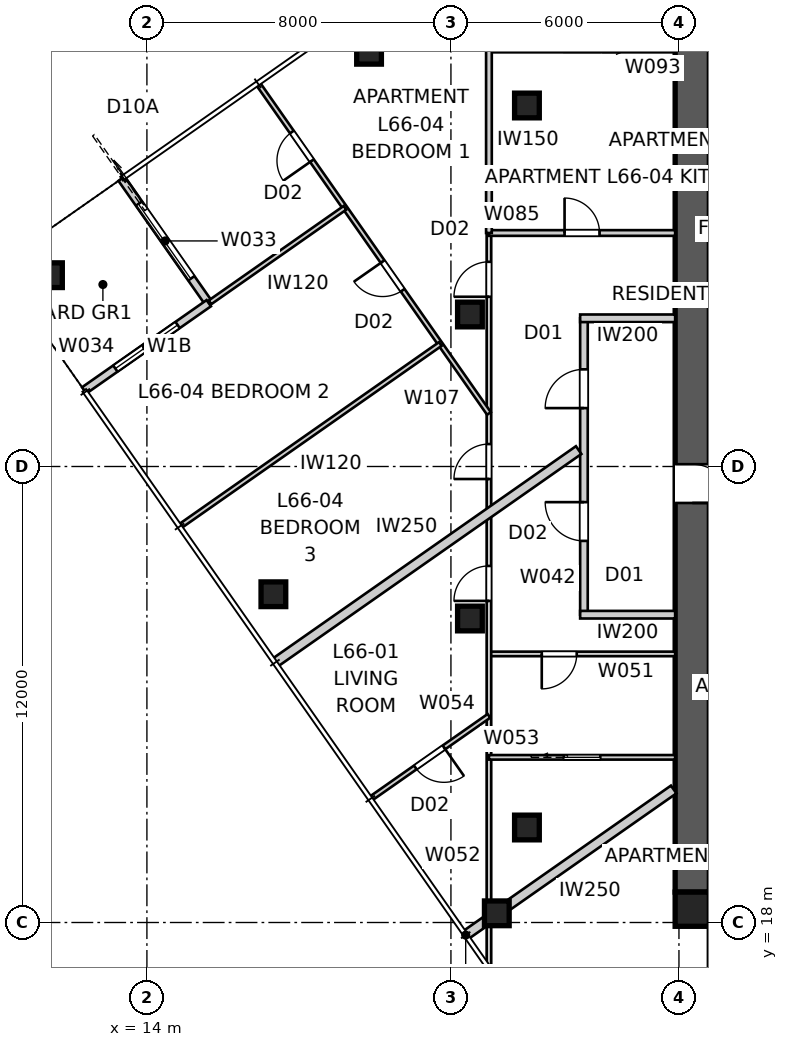
"""IFC4 building model, lengths in metres.
Left out: names, types, materials, properties, quantities, classifications, styles, units other than length and angle.
Written with IfcOpenShell. Run it as: python <this file> out.ifc"""

import sys

from ifc_helpers import new_model, si_unit, direction, frame, frame_2d, origin, origin_2d, place, context, subcontext, project, spatial, polyline, rectangle, outline, extrude, element, fill, save


model = new_model("IFC4")
c1 = context("Model", 3, precision=1e-05, world=origin(), true_north=direction((0.0, 1.0)))
c2 = subcontext(c1, "Body", "Model", "MODEL_VIEW")
j1 = project(units=[si_unit("LENGTHUNIT", "METRE"), si_unit("PLANEANGLEUNIT", "RADIAN")], contexts=[c1])
p1 = place(None, origin())
s1 = spatial("IfcSite", under=j1, at=p1, CompositionType="ELEMENT")
p2 = place(p1, origin())
s2 = spatial("IfcBuilding", under=s1, at=p2, CompositionType="ELEMENT")
p3 = place(p2, frame((0.0, 0.0, 240.4)))
s3 = spatial("IfcBuildingStorey", under=s2, at=p3, CompositionType="ELEMENT", Elevation=240.4)
p4 = place(p3, frame((51.2, 18.35, 0.0), z_axis=(0.0, 0.0, 1.0), x_axis=(-1.0, 0.0, 0.0)))
e1 = element("IfcWall", 1, at=p4, inside=s3, PredefinedType="SHEAR", context=c2, shape_type="SweptSolid", body=[
    extrude(outline(polyline([(0.0, -0.45), (22.4, -0.45), (22.4, -0.025), (22.85, -0.025), (22.85, 0.025), (22.4, 0.025), (22.4, 0.45), (0.0, 0.45), (0.0, 0.025), (-0.45, 0.025), (-0.45, -0.025), (0.0, -0.025), (0.0, -0.45)])), origin(), (0.0, 0.0, 1.0), 3.4),
])
p5 = place(p3, frame((28.35, 41.2, 0.0), z_axis=(0.0, 0.0, 1.0), x_axis=(0.0, -1.0, 0.0)))
e2 = element("IfcWall", 2, at=p5, inside=s3, PredefinedType="SHEAR", context=c2, shape_type="SweptSolid", body=[
    extrude(outline(polyline([(0.0, -0.45), (22.4, -0.45), (22.4, -0.025), (22.85, -0.025), (22.85, 0.025), (22.4, 0.025), (22.4, 0.45), (0.0, 0.45), (0.0, 0.025), (-0.45, 0.025), (-0.45, -0.025), (0.0, -0.025), (0.0, -0.45)])), origin(), (0.0, 0.0, 1.0), 3.4),
])
p6 = place(p5, frame((11.14, 0.0, 0.0)))
e3 = element("IfcOpeningElement", 3, at=p6, cuts=e2, PredefinedType="OPENING", context=c2, shape_type="SweptSolid", body=[
    extrude(rectangle(XDim=1.02, YDim=2.4, at=frame_2d((0.51, 1.2))), frame((0.0, 0.46, 0.0), z_axis=(0.0, -1.0, 0.0), x_axis=(1.0, 0.0, 0.0)), (0.0, 0.0, 1.0), 0.92),
])
p7 = place(p3, frame((28.35, 18.35, 0.0), z_axis=(0.0, 0.0, 1.0), x_axis=(1.0, 0.0, 0.0)))
e4 = element("IfcColumn", 4, at=p7, inside=s3, PredefinedType="COLUMN", context=c2, shape_type="SweptSolid", body=[
    extrude(rectangle(XDim=0.9, YDim=0.9, at=origin_2d()), origin(), (0.0, 0.0, 1.0), 3.4),
])
for number, where, z_axis, x_axis in (
    (5, (19.845, 40.914, -0.15), (0.0, 0.0, 1.0), (1.0, 0.0, 0.0)),
    (6, (11.449, 35.034, -0.15), (0.0, 0.0, 1.0), (1.0, 0.0, 0.0)),
    (7, (17.328, 26.638, -0.15), (0.0, 0.0, 1.0), (1.0, 0.0, 0.0)),
    (8, (23.207, 18.242, -0.15), (0.0, 0.0, 1.0), (1.0, 0.0, 0.0)),
):
    element("IfcColumn", number, at=place(p3, frame(where, z_axis=z_axis, x_axis=x_axis)), inside=s3, PredefinedType="COLUMN", context=c2, shape_type="SweptSolid", body=[
        extrude(rectangle(XDim=0.65, YDim=0.65, at=origin_2d()), origin(), (0.0, 0.0, 1.0), 3.55),
    ])
for number, where, z_axis, x_axis in (
    (9, (24.0, 39.5, 0.0), (0.0, 0.0, 1.0), (1.0, 0.0, 0.0)),
    (10, (22.5, 34.0, 0.0), (0.0, 0.0, 1.0), (1.0, 0.0, 0.0)),
    (11, (22.5, 26.0, 0.0), (0.0, 0.0, 1.0), (1.0, 0.0, 0.0)),
    (12, (24.0, 20.5, 0.0), (0.0, 0.0, 1.0), (1.0, 0.0, 0.0)),
):
    element("IfcColumn", number, at=place(p3, frame(where, z_axis=z_axis, x_axis=x_axis)), inside=s3, PredefinedType="COLUMN", context=c2, shape_type="SweptSolid", body=[
        extrude(rectangle(XDim=0.65, YDim=0.65, at=origin_2d()), origin(), (0.0, 0.0, 1.0), 3.4),
    ])
p8 = place(p3, frame((13.333, 37.574, 0.0), z_axis=(0.0, 0.0, 1.0), x_axis=(0.573556557423, -0.819165963305, 0.0)))
e13 = element("IfcWall", 13, at=p8, inside=s3, PredefinedType="SOLIDWALL", context=c2, shape_type="SweptSolid", body=[
    extrude(rectangle(XDim=4.0, YDim=0.2, at=frame_2d((2.0, 0.0))), origin(), (0.0, 0.0, 1.0), 3.25),
])
p9 = place(p8, frame((0.8, 0.0, 0.0)))
e14 = element("IfcOpeningElement", 14, at=p9, cuts=e13, PredefinedType="OPENING", context=c2, shape_type="SweptSolid", body=[
    extrude(rectangle(XDim=2.4, YDim=2.1, at=frame_2d((1.2, 1.05))), frame((0.0, 0.11, 0.0), z_axis=(0.0, -1.0, 0.0), x_axis=(1.0, 0.0, 0.0)), (0.0, 0.0, 1.0), 0.22),
])
p10 = place(p3, frame((15.627, 34.298, 0.0), z_axis=(0.0, 0.0, 1.0), x_axis=(-0.819137286189, -0.573597512525, 0.0)))
e15 = element("IfcWall", 15, at=p10, inside=s3, PredefinedType="SOLIDWALL", context=c2, shape_type="SweptSolid", body=[
    extrude(rectangle(XDim=4.0, YDim=0.2, at=frame_2d((2.0, 0.0))), origin(), (0.0, 0.0, 1.0), 3.25),
])
p11 = place(p10, frame((1.0, 0.0, 0.45)))
e16 = element("IfcOpeningElement", 16, at=p11, cuts=e15, PredefinedType="OPENING", context=c2, shape_type="SweptSolid", body=[
    extrude(rectangle(XDim=2.0, YDim=1.8, at=frame_2d((1.0, 0.9))), frame((0.0, 0.11, 0.0), z_axis=(0.0, -1.0, 0.0), x_axis=(1.0, 0.0, 0.0)), (0.0, 0.0, 1.0), 0.22),
])
p12 = place(p3, frame((25.5, 26.1, 0.0), z_axis=(0.0, 0.0, 1.0), x_axis=(0.0, 1.0, 0.0)))
e17 = element("IfcWall", 17, at=p12, inside=s3, PredefinedType="PARTITIONING", context=c2, shape_type="SweptSolid", body=[
    extrude(rectangle(XDim=7.8, YDim=0.2, at=frame_2d((3.9, 0.0))), origin(), (0.0, 0.0, 1.0), 3.25),
])
p13 = place(p12, frame((1.942, 0.0, 0.0)))
e18 = element("IfcOpeningElement", 18, at=p13, cuts=e17, PredefinedType="OPENING", context=c2, shape_type="SweptSolid", body=[
    extrude(rectangle(XDim=1.02, YDim=2.34, at=frame_2d((0.51, 1.17))), frame((0.0, 0.11, 0.0), z_axis=(0.0, -1.0, 0.0), x_axis=(1.0, 0.0, 0.0)), (0.0, 0.0, 1.0), 0.22),
])
p14 = place(p12, frame((5.437, 0.0, 0.0)))
e19 = element("IfcOpeningElement", 19, at=p14, cuts=e17, PredefinedType="OPENING", context=c2, shape_type="SweptSolid", body=[
    extrude(rectangle(XDim=1.02, YDim=2.34, at=frame_2d((0.51, 1.17))), frame((0.0, 0.11, 0.0), z_axis=(0.0, -1.0, 0.0), x_axis=(1.0, 0.0, 0.0)), (0.0, 0.0, 1.0), 0.22),
])
for number, where, z_axis, x_axis in (
    (20, (27.9, 33.9, 0.0), (0.0, 0.0, 1.0), (-1.0, 0.0, 0.0)),
    (21, (27.9, 26.1, 0.0), (0.0, 0.0, 1.0), (-1.0, 0.0, 0.0)),
):
    element("IfcWall", number, at=place(p3, frame(where, z_axis=z_axis, x_axis=x_axis)), inside=s3, PredefinedType="PARTITIONING", context=c2, shape_type="SweptSolid", body=[
        extrude(rectangle(XDim=2.5, YDim=0.2, at=frame_2d((1.25, 0.0))), origin(), (0.0, 0.0, 1.0), 3.25),
    ])
p15 = place(p3, frame((22.388, 17.668, 0.0), z_axis=(0.0, 0.0, 1.0), x_axis=(0.819161528122, 0.573562891796, 0.0)))
e22 = element("IfcWall", 22, at=p15, inside=s3, PredefinedType="PARTITIONING", context=c2, shape_type="SweptSolid", body=[
    extrude(rectangle(XDim=6.681, YDim=0.25, at=frame_2d((3.341, 0.0))), origin(), (0.0, 0.0, 1.0), 3.25),
])
p16 = place(p3, frame((17.369, 24.836, 0.0), z_axis=(0.0, 0.0, 1.0), x_axis=(0.81915902312, 0.573566469418, 0.0)))
e23 = element("IfcWall", 23, at=p16, inside=s3, PredefinedType="PARTITIONING", context=c2, shape_type="SweptSolid", body=[
    extrude(rectangle(XDim=9.756, YDim=0.25, at=frame_2d((4.878, 0.0))), origin(), (0.0, 0.0, 1.0), 3.25),
])
p17 = place(p3, frame((27.9, 25.068, 0.0), z_axis=(0.0, 0.0, 1.0), x_axis=(-1.0, 0.0, 0.0)))
e24 = element("IfcWall", 24, at=p17, inside=s3, PredefinedType="PARTITIONING", context=c2, shape_type="SweptSolid", body=[
    extrude(rectangle(XDim=4.9, YDim=0.12, at=frame_2d((2.45, 0.0))), origin(), (0.0, 0.0, 1.0), 3.25),
])
p18 = place(p17, frame((2.59, 0.0, 0.0)))
e25 = element("IfcOpeningElement", 25, at=p18, cuts=e24, PredefinedType="OPENING", context=c2, shape_type="SweptSolid", body=[
    extrude(rectangle(XDim=0.92, YDim=2.34, at=frame_2d((0.46, 1.17))), frame((0.0, 0.07, 0.0), z_axis=(0.0, -1.0, 0.0), x_axis=(1.0, 0.0, 0.0)), (0.0, 0.0, 1.0), 0.14),
])
p19 = place(p3, frame((23.0, 16.864, 0.0), z_axis=(0.0, 0.0, 1.0), x_axis=(0.0, 1.0, 0.0)))
e26 = element("IfcWall", 26, at=p19, inside=s3, PredefinedType="PARTITIONING", context=c2, shape_type="SweptSolid", body=[
    extrude(rectangle(XDim=19.28, YDim=0.12, at=frame_2d((9.64, 0.0))), origin(), (0.0, 0.0, 1.0), 2.55),
])
p20 = place(p19, frame((9.599, 0.0, 0.0)))
e27 = element("IfcOpeningElement", 27, at=p20, cuts=e26, PredefinedType="OPENING", context=c2, shape_type="SweptSolid", body=[
    extrude(rectangle(XDim=0.92, YDim=2.34, at=frame_2d((0.46, 1.17))), frame((0.0, 0.07, 0.0), z_axis=(0.0, -1.0, 0.0), x_axis=(1.0, 0.0, 0.0)), (0.0, 0.0, 1.0), 0.14),
])
p21 = place(p19, frame((17.603, 0.0, 0.0)))
e28 = element("IfcOpeningElement", 28, at=p21, cuts=e26, PredefinedType="OPENING", context=c2, shape_type="SweptSolid", body=[
    extrude(rectangle(XDim=0.92, YDim=2.34, at=frame_2d((0.46, 1.17))), frame((0.0, 0.07, 0.0), z_axis=(0.0, -1.0, 0.0), x_axis=(1.0, 0.0, 0.0)), (0.0, 0.0, 1.0), 0.14),
])
p22 = place(p19, frame((12.806, 0.0, 0.0)))
e29 = element("IfcOpeningElement", 29, at=p22, cuts=e26, PredefinedType="OPENING", context=c2, shape_type="SweptSolid", body=[
    extrude(rectangle(XDim=0.92, YDim=2.34, at=frame_2d((0.46, 1.17))), frame((0.0, 0.07, 0.0), z_axis=(0.0, -1.0, 0.0), x_axis=(1.0, 0.0, 0.0)), (0.0, 0.0, 1.0), 0.14),
])
p23 = place(p3, frame((23.0, 22.347, 0.0), z_axis=(0.0, 0.0, 1.0), x_axis=(1.0, 0.0, 0.0)))
e30 = element("IfcWall", 30, at=p23, inside=s3, PredefinedType="PARTITIONING", context=c2, shape_type="SweptSolid", body=[
    extrude(rectangle(XDim=4.9, YDim=0.12, at=frame_2d((2.45, 0.0))), origin(), (0.0, 0.0, 1.0), 3.25),
])
p24 = place(p23, frame((1.97, 0.0, 0.0)))
e31 = element("IfcOpeningElement", 31, at=p24, cuts=e30, PredefinedType="OPENING", context=c2, shape_type="SweptSolid", body=[
    extrude(rectangle(XDim=0.96, YDim=2.1, at=frame_2d((0.48, 1.05))), frame((0.0, 0.07, 0.0), z_axis=(0.0, -1.0, 0.0), x_axis=(1.0, 0.0, 0.0)), (0.0, 0.0, 1.0), 0.14),
])
p25 = place(p3, frame((23.0, 23.438, 0.0), z_axis=(0.0, 0.0, 1.0), x_axis=(-0.819140645834, -0.573592714688, 0.0)))
e32 = element("IfcWall", 32, at=p25, inside=s3, PredefinedType="PARTITIONING", context=c2, shape_type="SweptSolid", body=[
    extrude(rectangle(XDim=3.77, YDim=0.12, at=frame_2d((1.885, 0.0))), origin(), (0.0, 0.0, 1.0), 3.25),
])
p26 = place(p25, frame((1.445, 0.0, 0.0)))
e33 = element("IfcOpeningElement", 33, at=p26, cuts=e32, PredefinedType="OPENING", context=c2, shape_type="SweptSolid", body=[
    extrude(rectangle(XDim=0.92, YDim=2.34, at=frame_2d((0.46, 1.17))), frame((0.0, 0.07, 0.0), z_axis=(0.0, -1.0, 0.0), x_axis=(1.0, 0.0, 0.0)), (0.0, 0.0, 1.0), 0.14),
])
p27 = place(p3, frame((28.837, 17.9, 0.0), z_axis=(0.0, 0.0, 1.0), x_axis=(0.0, -1.0, 0.0)))
e34 = element("IfcWall", 34, at=p27, inside=s3, PredefinedType="SOLIDWALL", context=c2, shape_type="SweptSolid", body=[
    extrude(rectangle(XDim=4.9, YDim=0.15, at=frame_2d((2.45, 0.0))), origin(), (0.0, 0.0, 1.0), 3.25),
])
p28 = place(p27, frame((2.603, 0.0, 0.0)))
e35 = element("IfcOpeningElement", 35, at=p28, cuts=e34, PredefinedType="OPENING", context=c2, shape_type="SweptSolid", body=[
    extrude(rectangle(XDim=0.92, YDim=2.34, at=frame_2d((0.46, 1.17))), frame((0.0, 0.085, 0.0), z_axis=(0.0, -1.0, 0.0), x_axis=(1.0, 0.0, 0.0)), (0.0, 0.0, 1.0), 0.17),
])
p29 = place(p3, frame((23.0, 36.145, 0.0), z_axis=(0.0, 0.0, 1.0), x_axis=(1.0, 0.0, 0.0)))
e36 = element("IfcWall", 36, at=p29, inside=s3, PredefinedType="SOLIDWALL", context=c2, shape_type="SweptSolid", body=[
    extrude(rectangle(XDim=4.9, YDim=0.15, at=frame_2d((2.45, 0.0))), origin(), (0.0, 0.0, 1.0), 3.25),
])
p30 = place(p29, frame((1.99, 0.0, 0.0)))
e37 = element("IfcOpeningElement", 37, at=p30, cuts=e36, PredefinedType="OPENING", context=c2, shape_type="SweptSolid", body=[
    extrude(rectangle(XDim=0.92, YDim=2.34, at=frame_2d((0.46, 1.17))), frame((0.0, 0.085, 0.0), z_axis=(0.0, -1.0, 0.0), x_axis=(1.0, 0.0, 0.0)), (0.0, 0.0, 1.0), 0.17),
])
p31 = place(p3, frame((27.9, 40.974, 0.0), z_axis=(0.0, 0.0, 1.0), x_axis=(-1.0, 0.0, 0.0)))
e38 = element("IfcWall", 38, at=p31, inside=s3, PredefinedType="SOLIDWALL", context=c2, shape_type="SweptSolid", body=[
    extrude(rectangle(XDim=4.9, YDim=0.15, at=frame_2d((2.45, 0.0))), origin(), (0.0, 0.0, 1.0), 3.25),
])
p32 = place(p31, frame((1.97, 0.0, 0.0)))
e39 = element("IfcOpeningElement", 39, at=p32, cuts=e38, PredefinedType="OPENING", context=c2, shape_type="SweptSolid", body=[
    extrude(rectangle(XDim=0.96, YDim=2.1, at=frame_2d((0.48, 1.05))), frame((0.0, 0.085, 0.0), z_axis=(0.0, -1.0, 0.0), x_axis=(1.0, 0.0, 0.0)), (0.0, 0.0, 1.0), 0.17),
])
p33 = place(p3, frame((23.0, 31.396, 0.0), z_axis=(0.0, 0.0, 1.0), x_axis=(-0.573575545802, 0.819152667857, 0.0)))
e40 = element("IfcWall", 40, at=p33, inside=s3, PredefinedType="PARTITIONING", context=c2, shape_type="SweptSolid", body=[
    extrude(rectangle(XDim=10.566, YDim=0.12, at=frame_2d((5.283, 0.0))), origin(), (0.0, 0.0, 1.0), 3.25),
])
p34 = place(p33, frame((3.958, 0.0, 0.0)))
e41 = element("IfcOpeningElement", 41, at=p34, cuts=e40, PredefinedType="OPENING", context=c2, shape_type="SweptSolid", body=[
    extrude(rectangle(XDim=0.92, YDim=2.34, at=frame_2d((0.46, 1.17))), frame((0.0, 0.07, 0.0), z_axis=(0.0, -1.0, 0.0), x_axis=(1.0, 0.0, 0.0)), (0.0, 0.0, 1.0), 0.14),
])
p35 = place(p33, frame((8.121, 0.0, 0.0)))
e42 = element("IfcOpeningElement", 42, at=p35, cuts=e40, PredefinedType="OPENING", context=c2, shape_type="SweptSolid", body=[
    extrude(rectangle(XDim=0.92, YDim=2.34, at=frame_2d((0.46, 1.17))), frame((0.0, 0.07, 0.0), z_axis=(0.0, -1.0, 0.0), x_axis=(1.0, 0.0, 0.0)), (0.0, 0.0, 1.0), 0.14),
])
p36 = place(p3, frame((23.0, 41.024, 0.0), z_axis=(0.0, 0.0, 1.0), x_axis=(0.0, -1.0, 0.0)))
e43 = element("IfcWall", 43, at=p36, inside=s3, PredefinedType="SOLIDWALL", context=c2, shape_type="SweptSolid", body=[
    extrude(rectangle(XDim=4.879, YDim=0.15, at=frame_2d((2.44, 0.0))), origin(), (0.0, 0.0, 1.0), 3.25),
])
p37 = place(p3, frame((21.72, 33.223, 0.0), z_axis=(0.0, 0.0, 1.0), x_axis=(-0.819152099525, -0.573576357466, 0.0)))
e44 = element("IfcWall", 44, at=p37, inside=s3, PredefinedType="PARTITIONING", context=c2, shape_type="SweptSolid", body=[
    extrude(rectangle(XDim=8.335, YDim=0.12, at=frame_2d((4.167, 0.0))), origin(), (0.0, 0.0, 1.0), 3.25),
])
p38 = place(p3, frame((15.66, 34.321, 0.0), z_axis=(0.0, 0.0, 1.0), x_axis=(0.819165768115, 0.573556836197, 0.0)))
e45 = element("IfcWall", 45, at=p38, inside=s3, PredefinedType="PARTITIONING", context=c2, shape_type="SweptSolid", body=[
    extrude(rectangle(XDim=4.335, YDim=0.12, at=frame_2d((2.167, 0.0))), origin(), (0.0, 0.0, 1.0), 3.25),
])
p39 = place(p9, origin())
e46 = element("IfcDoor", 46, at=p39, inside=s3, OperationType="SLIDING_TO_LEFT", PredefinedType="DOOR", context=c2, shape_type="SweptSolid", body=[
    extrude(rectangle(XDim=2.4, YDim=2.1, at=frame_2d((1.2, 1.05))), frame((0.0, 0.025, 0.0), z_axis=(0.0, -1.0, 0.0), x_axis=(1.0, 0.0, 0.0)), (0.0, 0.0, 1.0), 0.05),
])
fill(e14, e46)
p40 = place(p11, origin())
e47 = element("IfcWindow", 47, at=p40, inside=s3, PartitioningType="SINGLE_PANEL", PredefinedType="WINDOW", context=c2, shape_type="SweptSolid", body=[
    extrude(rectangle(XDim=2.0, YDim=1.8, at=frame_2d((1.0, 0.9))), frame((0.0, 0.03, 0.0), z_axis=(0.0, -1.0, 0.0), x_axis=(1.0, 0.0, 0.0)), (0.0, 0.0, 1.0), 0.06),
])
fill(e16, e47)
p41 = place(p13, origin())
e48 = element("IfcDoor", 48, at=p41, inside=s3, OperationType="SINGLE_SWING_RIGHT", PredefinedType="DOOR", context=c2, shape_type="SweptSolid", body=[
    extrude(rectangle(XDim=1.02, YDim=2.34, at=frame_2d((0.51, 1.17))), frame((0.0, 0.025, 0.0), z_axis=(0.0, -1.0, 0.0), x_axis=(1.0, 0.0, 0.0)), (0.0, 0.0, 1.0), 0.05),
])
fill(e18, e48)
p42 = place(p14, origin())
e49 = element("IfcDoor", 49, at=p42, inside=s3, OperationType="SINGLE_SWING_LEFT", PredefinedType="DOOR", context=c2, shape_type="SweptSolid", body=[
    extrude(rectangle(XDim=1.02, YDim=2.34, at=frame_2d((0.51, 1.17))), frame((0.0, 0.025, 0.0), z_axis=(0.0, -1.0, 0.0), x_axis=(1.0, 0.0, 0.0)), (0.0, 0.0, 1.0), 0.05),
])
fill(e19, e49)
p43 = place(p18, origin())
e50 = element("IfcDoor", 50, at=p43, inside=s3, OperationType="SINGLE_SWING_RIGHT", PredefinedType="DOOR", context=c2, shape_type="SweptSolid", body=[
    extrude(rectangle(XDim=0.92, YDim=2.34, at=frame_2d((0.46, 1.17))), frame((0.0, 0.025, 0.0), z_axis=(0.0, -1.0, 0.0), x_axis=(1.0, 0.0, 0.0)), (0.0, 0.0, 1.0), 0.05),
])
fill(e25, e50)
p44 = place(p20, origin())
e51 = element("IfcDoor", 51, at=p44, inside=s3, OperationType="SINGLE_SWING_LEFT", PredefinedType="DOOR", context=c2, shape_type="SweptSolid", body=[
    extrude(rectangle(XDim=0.92, YDim=2.34, at=frame_2d((0.46, 1.17))), frame((0.0, 0.025, 0.0), z_axis=(0.0, -1.0, 0.0), x_axis=(1.0, 0.0, 0.0)), (0.0, 0.0, 1.0), 0.05),
])
fill(e27, e51)
p45 = place(p30, origin())
e52 = element("IfcDoor", 52, at=p45, inside=s3, OperationType="SINGLE_SWING_LEFT", PredefinedType="DOOR", context=c2, shape_type="SweptSolid", body=[
    extrude(rectangle(XDim=0.92, YDim=2.34, at=frame_2d((0.46, 1.17))), frame((0.0, 0.025, 0.0), z_axis=(0.0, -1.0, 0.0), x_axis=(1.0, 0.0, 0.0)), (0.0, 0.0, 1.0), 0.05),
])
fill(e37, e52)
p46 = place(p21, origin())
e53 = element("IfcDoor", 53, at=p46, inside=s3, OperationType="SINGLE_SWING_LEFT", PredefinedType="DOOR", context=c2, shape_type="SweptSolid", body=[
    extrude(rectangle(XDim=0.92, YDim=2.34, at=frame_2d((0.46, 1.17))), frame((0.0, 0.025, 0.0), z_axis=(0.0, -1.0, 0.0), x_axis=(1.0, 0.0, 0.0)), (0.0, 0.0, 1.0), 0.05),
])
fill(e28, e53)
p47 = place(p22, origin())
e54 = element("IfcDoor", 54, at=p47, inside=s3, OperationType="SINGLE_SWING_LEFT", PredefinedType="DOOR", context=c2, shape_type="SweptSolid", body=[
    extrude(rectangle(XDim=0.92, YDim=2.34, at=frame_2d((0.46, 1.17))), frame((0.0, 0.025, 0.0), z_axis=(0.0, -1.0, 0.0), x_axis=(1.0, 0.0, 0.0)), (0.0, 0.0, 1.0), 0.05),
])
fill(e29, e54)
p48 = place(p24, origin())
e55 = element("IfcDoor", 55, at=p48, inside=s3, OperationType="SLIDING_TO_LEFT", PredefinedType="DOOR", context=c2, shape_type="SweptSolid", body=[
    extrude(rectangle(XDim=0.96, YDim=2.1, at=frame_2d((0.48, 1.05))), frame((0.0, 0.025, 0.0), z_axis=(0.0, -1.0, 0.0), x_axis=(1.0, 0.0, 0.0)), (0.0, 0.0, 1.0), 0.05),
])
fill(e31, e55)
p49 = place(p26, origin())
e56 = element("IfcDoor", 56, at=p49, inside=s3, OperationType="SINGLE_SWING_LEFT", PredefinedType="DOOR", context=c2, shape_type="SweptSolid", body=[
    extrude(rectangle(XDim=0.92, YDim=2.34, at=frame_2d((0.46, 1.17))), frame((0.0, 0.025, 0.0), z_axis=(0.0, -1.0, 0.0), x_axis=(1.0, 0.0, 0.0)), (0.0, 0.0, 1.0), 0.05),
])
fill(e33, e56)
p50 = place(p34, origin())
e57 = element("IfcDoor", 57, at=p50, inside=s3, OperationType="SINGLE_SWING_RIGHT", PredefinedType="DOOR", context=c2, shape_type="SweptSolid", body=[
    extrude(rectangle(XDim=0.92, YDim=2.34, at=frame_2d((0.46, 1.17))), frame((0.0, 0.025, 0.0), z_axis=(0.0, -1.0, 0.0), x_axis=(1.0, 0.0, 0.0)), (0.0, 0.0, 1.0), 0.05),
])
fill(e41, e57)
p51 = place(p35, origin())
e58 = element("IfcDoor", 58, at=p51, inside=s3, OperationType="SINGLE_SWING_LEFT", PredefinedType="DOOR", context=c2, shape_type="SweptSolid", body=[
    extrude(rectangle(XDim=0.92, YDim=2.34, at=frame_2d((0.46, 1.17))), frame((0.0, 0.025, 0.0), z_axis=(0.0, -1.0, 0.0), x_axis=(1.0, 0.0, 0.0)), (0.0, 0.0, 1.0), 0.05),
])
fill(e42, e58)
p52 = place(p6, origin())
e59 = element("IfcDoor", 59, at=p52, inside=s3, OperationType="SINGLE_SWING_RIGHT", PredefinedType="DOOR", context=c2, shape_type="SweptSolid", body=[
    extrude(rectangle(XDim=1.02, YDim=2.4, at=frame_2d((0.51, 1.2))), frame((0.0, 0.025, 0.0), z_axis=(0.0, -1.0, 0.0), x_axis=(1.0, 0.0, 0.0)), (0.0, 0.0, 1.0), 0.05),
])
fill(e3, e59)
save(model, sys.argv[1])
